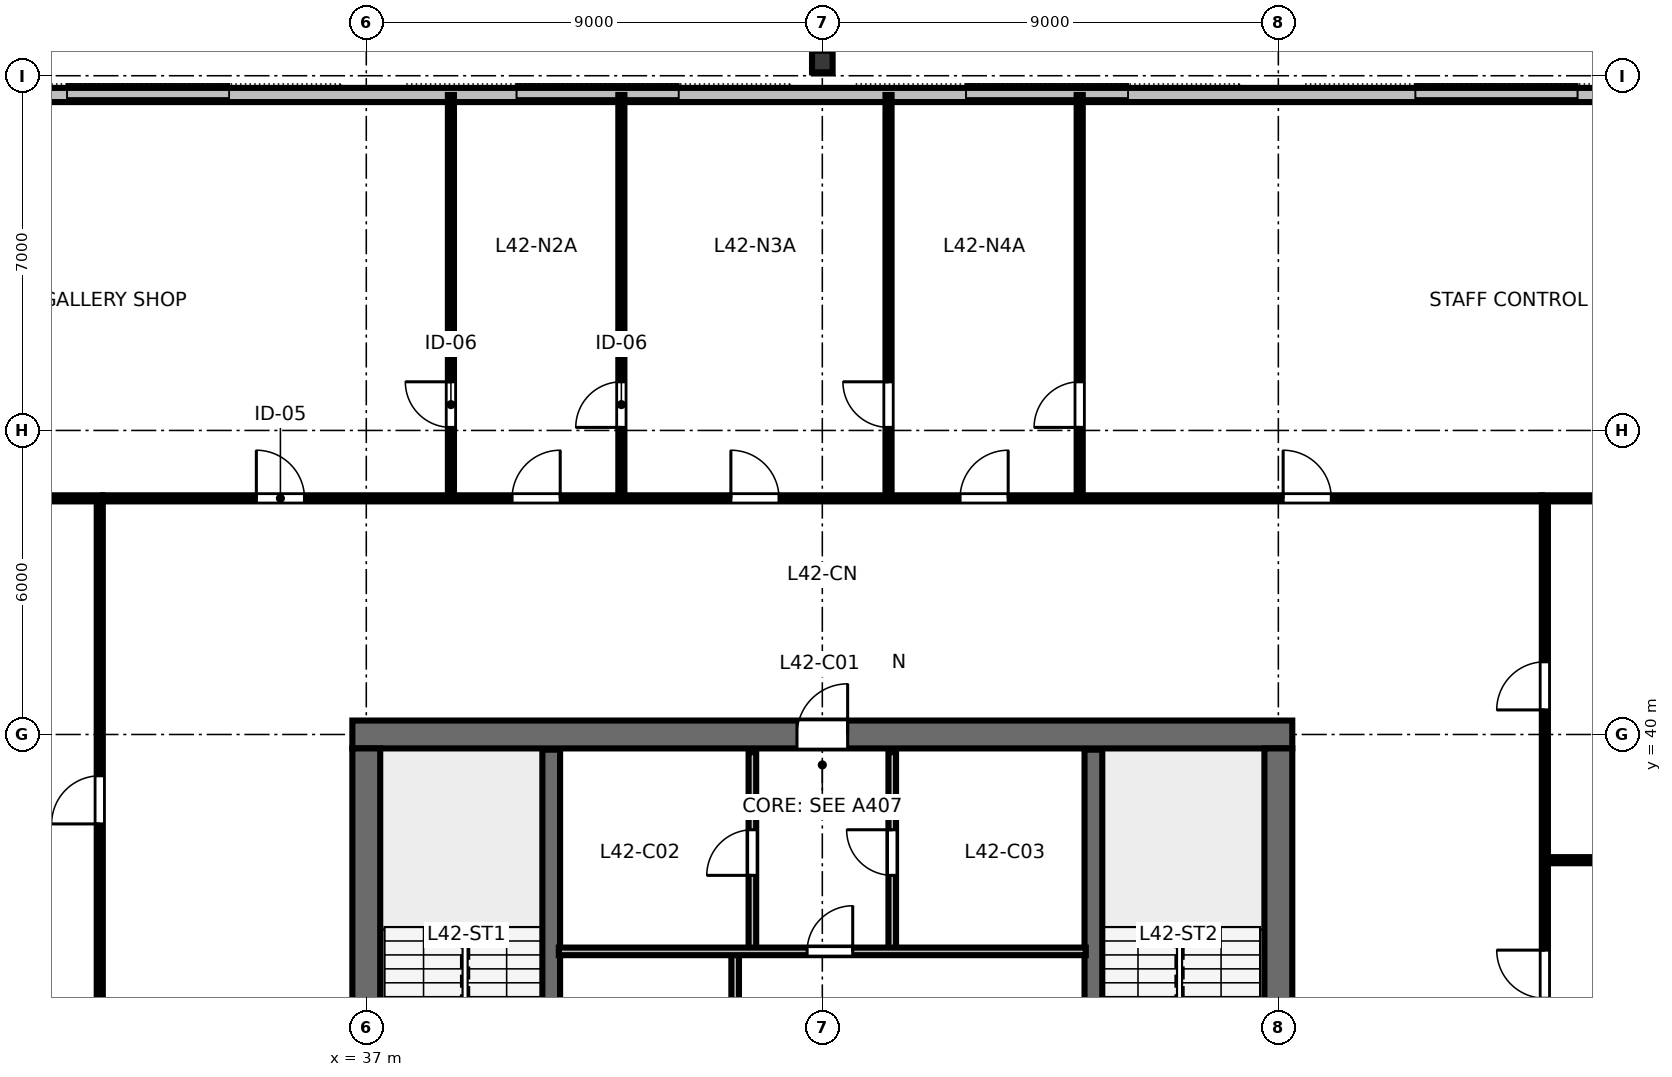
"""IFC4 building model, lengths in metres.
Left out: names, types, materials, properties, quantities, classifications, styles, units other than length and angle.
Written with IfcOpenShell. Run it as: python <this file> out.ifc"""

import sys

from ifc_helpers import new_model, si_unit, direction, frame, frame_2d, origin, origin_2d, place, context, subcontext, project, spatial, rectangle, i_section, extrude, element, fill, save


model = new_model("IFC4")
c1 = context("Model", 3, precision=1e-05, world=origin(), true_north=direction((0.0, 1.0)))
c2 = subcontext(c1, "Body", "Model", "MODEL_VIEW")
j1 = project(units=[si_unit("LENGTHUNIT", "METRE"), si_unit("PLANEANGLEUNIT", "RADIAN")], contexts=[c1])
p1 = place(None, origin())
s1 = spatial("IfcSite", under=j1, at=p1, CompositionType="ELEMENT")
p2 = place(p1, origin())
s2 = spatial("IfcBuilding", under=s1, at=p2, CompositionType="ELEMENT")
p3 = place(p2, frame((0.0, 0.0, 160.0)))
s3 = spatial("IfcBuildingStorey", under=s2, at=p3, CompositionType="ELEMENT", Elevation=160.0)
p4 = place(p3, frame((36.725, 40.0, 0.0), z_axis=(0.0, 0.0, 1.0), x_axis=(1.0, 0.0, 0.0)))
e1 = element("IfcWall", 1, at=p4, inside=s3, PredefinedType="SHEAR", context=c2, shape_type="SweptSolid", body=[
    extrude(rectangle(XDim=18.55, YDim=0.55, at=frame_2d((9.275, 0.0))), origin(), (0.0, 0.0, 1.0), 3.36),
])
p5 = place(p4, frame((8.775, 0.0, 0.0)))
e2 = element("IfcOpeningElement", 2, at=p5, cuts=e1, PredefinedType="OPENING", context=c2, shape_type="SweptSolid", body=[
    extrude(rectangle(XDim=1.0, YDim=2.15, at=frame_2d((0.5, 1.075))), frame((0.0, 0.285, 0.0), z_axis=(0.0, -1.0, 0.0), x_axis=(1.0, 0.0, 0.0)), (0.0, 0.0, 1.0), 0.57),
])
p6 = place(p3, frame((37.0, 24.275, 0.0), z_axis=(0.0, 0.0, 1.0), x_axis=(0.0, 1.0, 0.0)))
e3 = element("IfcWall", 3, at=p6, inside=s3, PredefinedType="SHEAR", context=c2, shape_type="SweptSolid", body=[
    extrude(rectangle(XDim=15.45, YDim=0.55, at=frame_2d((7.725, 0.0))), origin(), (0.0, 0.0, 1.0), 3.36),
])
p7 = place(p6, frame((5.25, 0.0, 0.0)))
e4 = element("IfcOpeningElement", 4, at=p7, cuts=e3, PredefinedType="OPENING", context=c2, shape_type="SweptSolid", body=[
    extrude(rectangle(XDim=1.15, YDim=2.15, at=frame_2d((0.575, 1.075))), frame((0.0, 0.285, 0.0), z_axis=(0.0, -1.0, 0.0), x_axis=(1.0, 0.0, 0.0)), (0.0, 0.0, 1.0), 0.57),
])
p8 = place(p3, frame((55.0, 24.275, 0.0), z_axis=(0.0, 0.0, 1.0), x_axis=(0.0, 1.0, 0.0)))
e5 = element("IfcWall", 5, at=p8, inside=s3, PredefinedType="SHEAR", context=c2, shape_type="SweptSolid", body=[
    extrude(rectangle(XDim=15.45, YDim=0.55, at=frame_2d((7.725, 0.0))), origin(), (0.0, 0.0, 1.0), 3.36),
])
p9 = place(p8, frame((5.25, 0.0, 0.0)))
e6 = element("IfcOpeningElement", 6, at=p9, cuts=e5, PredefinedType="OPENING", context=c2, shape_type="SweptSolid", body=[
    extrude(rectangle(XDim=1.15, YDim=2.15, at=frame_2d((0.575, 1.075))), frame((0.0, 0.285, 0.0), z_axis=(0.0, -1.0, 0.0), x_axis=(1.0, 0.0, 0.0)), (0.0, 0.0, 1.0), 0.57),
])
p10 = place(p3, frame((46.0, 53.28, 0.0), z_axis=(0.0, 0.0, 1.0), x_axis=(1.0, 0.0, 0.0)))
e7 = element("IfcColumn", 7, at=p10, inside=s3, PredefinedType="COLUMN", context=c2, shape_type="SweptSolid", body=[
    extrude(i_section(OverallWidth=0.406, OverallDepth=0.425, WebThickness=0.033, FlangeThickness=0.052, FilletRadius=0.025, at=origin_2d()), origin(), (0.0, 0.0, 1.0), 3.358),
])
p11 = place(p3, frame((64.64, 52.62, 0.0), z_axis=(0.0, 0.0, 1.0), x_axis=(-1.0, 0.0, 0.0)))
e8 = element("IfcWall", 8, at=p11, inside=s3, PredefinedType="STANDARD", context=c2, shape_type="SweptSolid", body=[
    extrude(rectangle(XDim=37.28, YDim=0.28, at=frame_2d((18.64, 0.0))), origin(), (0.0, 0.0, 1.0), 3.36),
])
for number, where, z_axis, x_axis in (
    (9, (40.65, 32.0, 0.0), (0.0, 0.0, 1.0), (0.0, 1.0, 0.0)),
    (10, (51.35, 32.0, 0.0), (0.0, 0.0, 1.0), (0.0, 1.0, 0.0)),
):
    element("IfcWall", number, at=place(p3, frame(where, z_axis=z_axis, x_axis=x_axis)), inside=s3, PredefinedType="SHEAR", context=c2, shape_type="SweptSolid", body=[
        extrude(rectangle(XDim=7.7, YDim=0.35, at=frame_2d((3.85, 0.0))), origin(), (0.0, 0.0, 1.0), 3.6),
    ])
p12 = place(p3, frame((44.62, 35.72, 0.0), z_axis=(0.0, 0.0, 1.0), x_axis=(0.0, 1.0, 0.0)))
e11 = element("IfcWall", 11, at=p12, inside=s3, PredefinedType="PARTITIONING", context=c2, shape_type="SweptSolid", body=[
    extrude(rectangle(XDim=3.93, YDim=0.15, at=frame_2d((1.965, 0.0))), origin(), (0.0, 0.0, 1.0), 3.36),
])
p13 = place(p12, frame((1.5, 0.0, 0.0)))
e12 = element("IfcOpeningElement", 12, at=p13, cuts=e11, PredefinedType="OPENING", context=c2, shape_type="SweptSolid", body=[
    extrude(rectangle(XDim=0.9, YDim=2.15, at=frame_2d((0.45, 1.075))), frame((0.0, 0.085, 0.0), z_axis=(0.0, -1.0, 0.0), x_axis=(1.0, 0.0, 0.0)), (0.0, 0.0, 1.0), 0.17),
])
p14 = place(p3, frame((47.38, 35.72, 0.0), z_axis=(0.0, 0.0, 1.0), x_axis=(0.0, 1.0, 0.0)))
e13 = element("IfcWall", 13, at=p14, inside=s3, PredefinedType="PARTITIONING", context=c2, shape_type="SweptSolid", body=[
    extrude(rectangle(XDim=3.93, YDim=0.15, at=frame_2d((1.965, 0.0))), origin(), (0.0, 0.0, 1.0), 3.36),
])
p15 = place(p14, frame((1.5, 0.0, 0.0)))
e14 = element("IfcOpeningElement", 14, at=p15, cuts=e13, PredefinedType="OPENING", context=c2, shape_type="SweptSolid", body=[
    extrude(rectangle(XDim=0.9, YDim=2.15, at=frame_2d((0.45, 1.075))), frame((0.0, 0.085, 0.0), z_axis=(0.0, -1.0, 0.0), x_axis=(1.0, 0.0, 0.0)), (0.0, 0.0, 1.0), 0.17),
])
p16 = place(p3, frame((44.28, 32.05, 0.0), z_axis=(0.0, 0.0, 1.0), x_axis=(0.0, 1.0, 0.0)))
e15 = element("IfcWall", 15, at=p16, inside=s3, PredefinedType="PARTITIONING", context=c2, shape_type="SweptSolid", body=[
    extrude(rectangle(XDim=3.67, YDim=0.15, at=frame_2d((1.835, 0.0))), origin(), (0.0, 0.0, 1.0), 3.36),
])
p17 = place(p16, frame((1.35, 0.0, 0.0)))
e16 = element("IfcOpeningElement", 16, at=p17, cuts=e15, PredefinedType="OPENING", context=c2, shape_type="SweptSolid", body=[
    extrude(rectangle(XDim=0.92, YDim=2.15, at=frame_2d((0.46, 1.075))), frame((0.0, 0.085, 0.0), z_axis=(0.0, -1.0, 0.0), x_axis=(1.0, 0.0, 0.0)), (0.0, 0.0, 1.0), 0.17),
])
p18 = place(p3, frame((40.8, 35.72, 0.0), z_axis=(0.0, 0.0, 1.0), x_axis=(1.0, 0.0, 0.0)))
e17 = element("IfcWall", 17, at=p18, inside=s3, PredefinedType="PARTITIONING", context=c2, shape_type="SweptSolid", body=[
    extrude(rectangle(XDim=10.4, YDim=0.15, at=frame_2d((5.2, 0.0))), origin(), (0.0, 0.0, 1.0), 3.36),
])
p19 = place(p18, frame((4.9, 0.0, 0.0)))
e18 = element("IfcOpeningElement", 18, at=p19, cuts=e17, PredefinedType="OPENING", context=c2, shape_type="SweptSolid", body=[
    extrude(rectangle(XDim=0.9, YDim=2.15, at=frame_2d((0.45, 1.075))), frame((0.0, 0.085, 0.0), z_axis=(0.0, -1.0, 0.0), x_axis=(1.0, 0.0, 0.0)), (0.0, 0.0, 1.0), 0.17),
])
p20 = place(p3, frame((38.67, 44.66, 0.0), z_axis=(0.0, 0.0, 1.0), x_axis=(0.0, 1.0, 0.0)))
e19 = element("IfcWall", 19, at=p20, inside=s3, PredefinedType="PARTITIONING", context=c2, shape_type="SweptSolid", body=[
    extrude(rectangle(XDim=7.96, YDim=0.12, at=frame_2d((3.98, 0.0))), origin(), (0.0, 0.0, 1.0), 2.64),
])
p21 = place(p20, frame((1.4, 0.0, 0.0)))
e20 = element("IfcOpeningElement", 20, at=p21, cuts=e19, PredefinedType="OPENING", context=c2, shape_type="SweptSolid", body=[
    extrude(rectangle(XDim=0.9, YDim=2.15, at=frame_2d((0.45, 1.075))), frame((0.0, 0.07, 0.0), z_axis=(0.0, -1.0, 0.0), x_axis=(1.0, 0.0, 0.0)), (0.0, 0.0, 1.0), 0.14),
])
p22 = place(p3, frame((42.034, 44.66, 0.0), z_axis=(0.0, 0.0, 1.0), x_axis=(0.0, 1.0, 0.0)))
e21 = element("IfcWall", 21, at=p22, inside=s3, PredefinedType="PARTITIONING", context=c2, shape_type="SweptSolid", body=[
    extrude(rectangle(XDim=7.96, YDim=0.12, at=frame_2d((3.98, 0.0))), origin(), (0.0, 0.0, 1.0), 2.64),
])
p23 = place(p22, frame((1.4, 0.0, 0.0)))
e22 = element("IfcOpeningElement", 22, at=p23, cuts=e21, PredefinedType="OPENING", context=c2, shape_type="SweptSolid", body=[
    extrude(rectangle(XDim=0.9, YDim=2.15, at=frame_2d((0.45, 1.075))), frame((0.0, 0.07, 0.0), z_axis=(0.0, -1.0, 0.0), x_axis=(1.0, 0.0, 0.0)), (0.0, 0.0, 1.0), 0.14),
])
p24 = place(p3, frame((47.307, 44.66, 0.0), z_axis=(0.0, 0.0, 1.0), x_axis=(0.0, 1.0, 0.0)))
e23 = element("IfcWall", 23, at=p24, inside=s3, PredefinedType="PARTITIONING", context=c2, shape_type="SweptSolid", body=[
    extrude(rectangle(XDim=7.96, YDim=0.12, at=frame_2d((3.98, 0.0))), origin(), (0.0, 0.0, 1.0), 2.64),
])
p25 = place(p24, frame((1.4, 0.0, 0.0)))
e24 = element("IfcOpeningElement", 24, at=p25, cuts=e23, PredefinedType="OPENING", context=c2, shape_type="SweptSolid", body=[
    extrude(rectangle(XDim=0.9, YDim=2.15, at=frame_2d((0.45, 1.075))), frame((0.0, 0.07, 0.0), z_axis=(0.0, -1.0, 0.0), x_axis=(1.0, 0.0, 0.0)), (0.0, 0.0, 1.0), 0.14),
])
p26 = place(p3, frame((51.08, 44.66, 0.0), z_axis=(0.0, 0.0, 1.0), x_axis=(0.0, 1.0, 0.0)))
e25 = element("IfcWall", 25, at=p26, inside=s3, PredefinedType="PARTITIONING", context=c2, shape_type="SweptSolid", body=[
    extrude(rectangle(XDim=7.96, YDim=0.12, at=frame_2d((3.98, 0.0))), origin(), (0.0, 0.0, 1.0), 2.64),
])
p27 = place(p26, frame((1.4, 0.0, 0.0)))
e26 = element("IfcOpeningElement", 26, at=p27, cuts=e25, PredefinedType="OPENING", context=c2, shape_type="SweptSolid", body=[
    extrude(rectangle(XDim=0.9, YDim=2.15, at=frame_2d((0.45, 1.075))), frame((0.0, 0.07, 0.0), z_axis=(0.0, -1.0, 0.0), x_axis=(1.0, 0.0, 0.0)), (0.0, 0.0, 1.0), 0.14),
])
p28 = place(p3, frame((31.8, 44.66, 0.0), z_axis=(0.0, 0.0, 1.0), x_axis=(1.0, 0.0, 0.0)))
e27 = element("IfcWall", 27, at=p28, inside=s3, PredefinedType="PARTITIONING", context=c2, shape_type="SweptSolid", body=[
    extrude(rectangle(XDim=28.4, YDim=0.12, at=frame_2d((14.2, 0.0))), origin(), (0.0, 0.0, 1.0), 2.64),
])
p29 = place(p28, frame((3.03, 0.0, 0.0)))
e28 = element("IfcOpeningElement", 28, at=p29, cuts=e27, PredefinedType="OPENING", context=c2, shape_type="SweptSolid", body=[
    extrude(rectangle(XDim=0.95, YDim=2.15, at=frame_2d((0.475, 1.075))), frame((0.0, 0.07, 0.0), z_axis=(0.0, -1.0, 0.0), x_axis=(1.0, 0.0, 0.0)), (0.0, 0.0, 1.0), 0.14),
])
p30 = place(p28, frame((8.077, 0.0, 0.0)))
e29 = element("IfcOpeningElement", 29, at=p30, cuts=e27, PredefinedType="OPENING", context=c2, shape_type="SweptSolid", body=[
    extrude(rectangle(XDim=0.95, YDim=2.15, at=frame_2d((0.475, 1.075))), frame((0.0, 0.07, 0.0), z_axis=(0.0, -1.0, 0.0), x_axis=(1.0, 0.0, 0.0)), (0.0, 0.0, 1.0), 0.14),
])
p31 = place(p28, frame((12.396, 0.0, 0.0)))
e30 = element("IfcOpeningElement", 30, at=p31, cuts=e27, PredefinedType="OPENING", context=c2, shape_type="SweptSolid", body=[
    extrude(rectangle(XDim=0.95, YDim=2.15, at=frame_2d((0.475, 1.075))), frame((0.0, 0.07, 0.0), z_axis=(0.0, -1.0, 0.0), x_axis=(1.0, 0.0, 0.0)), (0.0, 0.0, 1.0), 0.14),
])
p32 = place(p28, frame((16.918, 0.0, 0.0)))
e31 = element("IfcOpeningElement", 31, at=p32, cuts=e27, PredefinedType="OPENING", context=c2, shape_type="SweptSolid", body=[
    extrude(rectangle(XDim=0.95, YDim=2.15, at=frame_2d((0.475, 1.075))), frame((0.0, 0.07, 0.0), z_axis=(0.0, -1.0, 0.0), x_axis=(1.0, 0.0, 0.0)), (0.0, 0.0, 1.0), 0.14),
])
p33 = place(p28, frame((23.295, 0.0, 0.0)))
e32 = element("IfcOpeningElement", 32, at=p33, cuts=e27, PredefinedType="OPENING", context=c2, shape_type="SweptSolid", body=[
    extrude(rectangle(XDim=0.95, YDim=2.15, at=frame_2d((0.475, 1.075))), frame((0.0, 0.07, 0.0), z_axis=(0.0, -1.0, 0.0), x_axis=(1.0, 0.0, 0.0)), (0.0, 0.0, 1.0), 0.14),
])
p34 = place(p3, frame((31.74, 33.02, 0.0), z_axis=(0.0, 0.0, 1.0), x_axis=(0.0, 1.0, 0.0)))
e33 = element("IfcWall", 33, at=p34, inside=s3, PredefinedType="PARTITIONING", context=c2, shape_type="SweptSolid", body=[
    extrude(rectangle(XDim=11.58, YDim=0.12, at=frame_2d((5.79, 0.0))), origin(), (0.0, 0.0, 1.0), 2.64),
])
p35 = place(p34, frame((5.215, 0.0, 0.0)))
e34 = element("IfcOpeningElement", 34, at=p35, cuts=e33, PredefinedType="OPENING", context=c2, shape_type="SweptSolid", body=[
    extrude(rectangle(XDim=0.95, YDim=2.15, at=frame_2d((0.475, 1.075))), frame((0.0, 0.07, 0.0), z_axis=(0.0, -1.0, 0.0), x_axis=(1.0, 0.0, 0.0)), (0.0, 0.0, 1.0), 0.14),
])
p36 = place(p3, frame((60.26, 37.519, 0.0), z_axis=(0.0, 0.0, 1.0), x_axis=(1.0, 0.0, 0.0)))
e35 = element("IfcWall", 35, at=p36, inside=s3, PredefinedType="PARTITIONING", context=c2, shape_type="SweptSolid", body=[
    extrude(rectangle(XDim=9.16, YDim=0.12, at=frame_2d((4.58, 0.0))), origin(), (0.0, 0.0, 1.0), 2.64),
])
p37 = place(p36, frame((1.4, 0.0, 0.0)))
e36 = element("IfcOpeningElement", 36, at=p37, cuts=e35, PredefinedType="OPENING", context=c2, shape_type="SweptSolid", body=[
    extrude(rectangle(XDim=0.9, YDim=2.15, at=frame_2d((0.45, 1.075))), frame((0.0, 0.07, 0.0), z_axis=(0.0, -1.0, 0.0), x_axis=(1.0, 0.0, 0.0)), (0.0, 0.0, 1.0), 0.14),
])
p38 = place(p3, frame((60.26, 33.02, 0.0), z_axis=(0.0, 0.0, 1.0), x_axis=(0.0, 1.0, 0.0)))
e37 = element("IfcWall", 37, at=p38, inside=s3, PredefinedType="PARTITIONING", context=c2, shape_type="SweptSolid", body=[
    extrude(rectangle(XDim=11.58, YDim=0.12, at=frame_2d((5.79, 0.0))), origin(), (0.0, 0.0, 1.0), 2.64),
])
p39 = place(p38, frame((1.775, 0.0, 0.0)))
e38 = element("IfcOpeningElement", 38, at=p39, cuts=e37, PredefinedType="OPENING", context=c2, shape_type="SweptSolid", body=[
    extrude(rectangle(XDim=0.95, YDim=2.15, at=frame_2d((0.475, 1.075))), frame((0.0, 0.07, 0.0), z_axis=(0.0, -1.0, 0.0), x_axis=(1.0, 0.0, 0.0)), (0.0, 0.0, 1.0), 0.14),
])
p40 = place(p38, frame((7.465, 0.0, 0.0)))
e39 = element("IfcOpeningElement", 39, at=p40, cuts=e37, PredefinedType="OPENING", context=c2, shape_type="SweptSolid", body=[
    extrude(rectangle(XDim=0.95, YDim=2.15, at=frame_2d((0.475, 1.075))), frame((0.0, 0.07, 0.0), z_axis=(0.0, -1.0, 0.0), x_axis=(1.0, 0.0, 0.0)), (0.0, 0.0, 1.0), 0.14),
])
for number, where, z_axis, x_axis in (
    (40, (31.8, 44.66, 0.0), (0.0, 0.0, 1.0), (-1.0, 0.0, 0.0)),
    (41, (60.2, 44.66, 0.0), (0.0, 0.0, 1.0), (1.0, 0.0, 0.0)),
):
    element("IfcWall", number, at=place(p3, frame(where, z_axis=z_axis, x_axis=x_axis)), inside=s3, PredefinedType="PARTITIONING", context=c2, shape_type="SweptSolid", body=[
        extrude(rectangle(XDim=9.22, YDim=0.12, at=frame_2d((4.61, 0.0))), origin(), (0.0, 0.0, 1.0), 2.64),
    ])
p41 = place(p5, origin())
e42 = element("IfcDoor", 42, at=p41, inside=s3, OperationType="SINGLE_SWING_RIGHT", PredefinedType="DOOR", context=c2, shape_type="SweptSolid", body=[
    extrude(rectangle(XDim=1.0, YDim=2.15, at=frame_2d((0.5, 1.075))), frame((0.0, 0.025, 0.0), z_axis=(0.0, -1.0, 0.0), x_axis=(1.0, 0.0, 0.0)), (0.0, 0.0, 1.0), 0.05),
])
fill(e2, e42)
p42 = place(p13, origin())
e43 = element("IfcDoor", 43, at=p42, inside=s3, OperationType="SINGLE_SWING_LEFT", PredefinedType="DOOR", context=c2, shape_type="SweptSolid", body=[
    extrude(rectangle(XDim=0.9, YDim=2.15, at=frame_2d((0.45, 1.075))), frame((0.0, 0.025, 0.0), z_axis=(0.0, -1.0, 0.0), x_axis=(1.0, 0.0, 0.0)), (0.0, 0.0, 1.0), 0.05),
])
fill(e12, e43)
p43 = place(p15, origin())
e44 = element("IfcDoor", 44, at=p43, inside=s3, OperationType="SINGLE_SWING_RIGHT", PredefinedType="DOOR", context=c2, shape_type="SweptSolid", body=[
    extrude(rectangle(XDim=0.9, YDim=2.15, at=frame_2d((0.45, 1.075))), frame((0.0, 0.025, 0.0), z_axis=(0.0, -1.0, 0.0), x_axis=(1.0, 0.0, 0.0)), (0.0, 0.0, 1.0), 0.05),
])
fill(e14, e44)
p44 = place(p19, origin())
e45 = element("IfcDoor", 45, at=p44, inside=s3, OperationType="SINGLE_SWING_RIGHT", PredefinedType="DOOR", context=c2, shape_type="SweptSolid", body=[
    extrude(rectangle(XDim=0.9, YDim=2.15, at=frame_2d((0.45, 1.075))), frame((0.0, 0.025, 0.0), z_axis=(0.0, -1.0, 0.0), x_axis=(1.0, 0.0, 0.0)), (0.0, 0.0, 1.0), 0.05),
])
fill(e18, e45)
p45 = place(p21, origin())
e46 = element("IfcDoor", 46, at=p45, inside=s3, OperationType="SINGLE_SWING_RIGHT", PredefinedType="DOOR", context=c2, shape_type="SweptSolid", body=[
    extrude(rectangle(XDim=0.9, YDim=2.15, at=frame_2d((0.45, 1.075))), frame((0.0, 0.025, 0.0), z_axis=(0.0, -1.0, 0.0), x_axis=(1.0, 0.0, 0.0)), (0.0, 0.0, 1.0), 0.05),
])
fill(e20, e46)
p46 = place(p23, origin())
e47 = element("IfcDoor", 47, at=p46, inside=s3, OperationType="SINGLE_SWING_LEFT", PredefinedType="DOOR", context=c2, shape_type="SweptSolid", body=[
    extrude(rectangle(XDim=0.9, YDim=2.15, at=frame_2d((0.45, 1.075))), frame((0.0, 0.025, 0.0), z_axis=(0.0, -1.0, 0.0), x_axis=(1.0, 0.0, 0.0)), (0.0, 0.0, 1.0), 0.05),
])
fill(e22, e47)
p47 = place(p25, origin())
e48 = element("IfcDoor", 48, at=p47, inside=s3, OperationType="SINGLE_SWING_RIGHT", PredefinedType="DOOR", context=c2, shape_type="SweptSolid", body=[
    extrude(rectangle(XDim=0.9, YDim=2.15, at=frame_2d((0.45, 1.075))), frame((0.0, 0.025, 0.0), z_axis=(0.0, -1.0, 0.0), x_axis=(1.0, 0.0, 0.0)), (0.0, 0.0, 1.0), 0.05),
])
fill(e24, e48)
p48 = place(p27, origin())
e49 = element("IfcDoor", 49, at=p48, inside=s3, OperationType="SINGLE_SWING_LEFT", PredefinedType="DOOR", context=c2, shape_type="SweptSolid", body=[
    extrude(rectangle(XDim=0.9, YDim=2.15, at=frame_2d((0.45, 1.075))), frame((0.0, 0.025, 0.0), z_axis=(0.0, -1.0, 0.0), x_axis=(1.0, 0.0, 0.0)), (0.0, 0.0, 1.0), 0.05),
])
fill(e26, e49)
p49 = place(p29, origin())
e50 = element("IfcDoor", 50, at=p49, inside=s3, OperationType="SINGLE_SWING_LEFT", PredefinedType="DOOR", context=c2, shape_type="SweptSolid", body=[
    extrude(rectangle(XDim=0.95, YDim=2.15, at=frame_2d((0.475, 1.075))), frame((0.0, 0.025, 0.0), z_axis=(0.0, -1.0, 0.0), x_axis=(1.0, 0.0, 0.0)), (0.0, 0.0, 1.0), 0.05),
])
fill(e28, e50)
p50 = place(p30, origin())
e51 = element("IfcDoor", 51, at=p50, inside=s3, OperationType="SINGLE_SWING_RIGHT", PredefinedType="DOOR", context=c2, shape_type="SweptSolid", body=[
    extrude(rectangle(XDim=0.95, YDim=2.15, at=frame_2d((0.475, 1.075))), frame((0.0, 0.025, 0.0), z_axis=(0.0, -1.0, 0.0), x_axis=(1.0, 0.0, 0.0)), (0.0, 0.0, 1.0), 0.05),
])
fill(e29, e51)
p51 = place(p31, origin())
e52 = element("IfcDoor", 52, at=p51, inside=s3, OperationType="SINGLE_SWING_LEFT", PredefinedType="DOOR", context=c2, shape_type="SweptSolid", body=[
    extrude(rectangle(XDim=0.95, YDim=2.15, at=frame_2d((0.475, 1.075))), frame((0.0, 0.025, 0.0), z_axis=(0.0, -1.0, 0.0), x_axis=(1.0, 0.0, 0.0)), (0.0, 0.0, 1.0), 0.05),
])
fill(e30, e52)
p52 = place(p32, origin())
e53 = element("IfcDoor", 53, at=p52, inside=s3, OperationType="SINGLE_SWING_RIGHT", PredefinedType="DOOR", context=c2, shape_type="SweptSolid", body=[
    extrude(rectangle(XDim=0.95, YDim=2.15, at=frame_2d((0.475, 1.075))), frame((0.0, 0.025, 0.0), z_axis=(0.0, -1.0, 0.0), x_axis=(1.0, 0.0, 0.0)), (0.0, 0.0, 1.0), 0.05),
])
fill(e31, e53)
p53 = place(p33, origin())
e54 = element("IfcDoor", 54, at=p53, inside=s3, OperationType="SINGLE_SWING_LEFT", PredefinedType="DOOR", context=c2, shape_type="SweptSolid", body=[
    extrude(rectangle(XDim=0.95, YDim=2.15, at=frame_2d((0.475, 1.075))), frame((0.0, 0.025, 0.0), z_axis=(0.0, -1.0, 0.0), x_axis=(1.0, 0.0, 0.0)), (0.0, 0.0, 1.0), 0.05),
])
fill(e32, e54)
p54 = place(p35, origin())
e55 = element("IfcDoor", 55, at=p54, inside=s3, OperationType="SINGLE_SWING_LEFT", PredefinedType="DOOR", context=c2, shape_type="SweptSolid", body=[
    extrude(rectangle(XDim=0.95, YDim=2.15, at=frame_2d((0.475, 1.075))), frame((0.0, 0.025, 0.0), z_axis=(0.0, -1.0, 0.0), x_axis=(1.0, 0.0, 0.0)), (0.0, 0.0, 1.0), 0.05),
])
fill(e34, e55)
p55 = place(p39, origin())
e56 = element("IfcDoor", 56, at=p55, inside=s3, OperationType="SINGLE_SWING_RIGHT", PredefinedType="DOOR", context=c2, shape_type="SweptSolid", body=[
    extrude(rectangle(XDim=0.95, YDim=2.15, at=frame_2d((0.475, 1.075))), frame((0.0, 0.025, 0.0), z_axis=(0.0, -1.0, 0.0), x_axis=(1.0, 0.0, 0.0)), (0.0, 0.0, 1.0), 0.05),
])
fill(e38, e56)
p56 = place(p40, origin())
e57 = element("IfcDoor", 57, at=p56, inside=s3, OperationType="SINGLE_SWING_LEFT", PredefinedType="DOOR", context=c2, shape_type="SweptSolid", body=[
    extrude(rectangle(XDim=0.95, YDim=2.15, at=frame_2d((0.475, 1.075))), frame((0.0, 0.025, 0.0), z_axis=(0.0, -1.0, 0.0), x_axis=(1.0, 0.0, 0.0)), (0.0, 0.0, 1.0), 0.05),
])
fill(e39, e57)
save(model, sys.argv[1])
